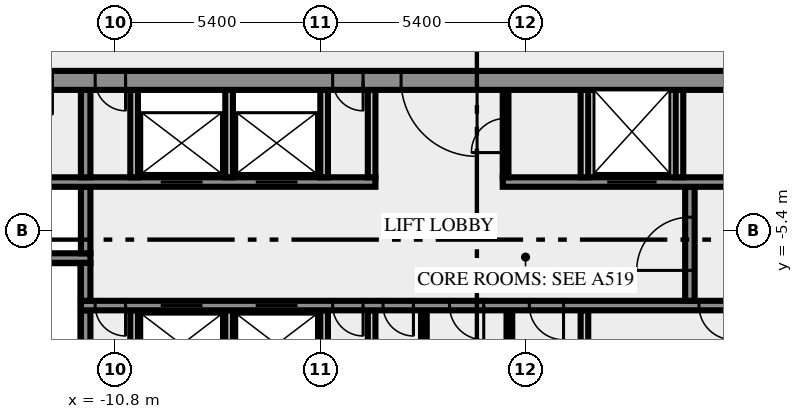
"""IFC4 building model, lengths in metres.
Left out: names, types, materials, properties, quantities, classifications, styles, units other than length and angle.
Written with IfcOpenShell. Run it as: python <this file> out.ifc"""

import sys

from ifc_helpers import new_model, si_unit, direction, frame, frame_2d, origin, place, context, subcontext, project, spatial, rectangle, extrude, element, fill, save


model = new_model("IFC4")
c1 = context("Model", 3, precision=1e-05, world=origin(), true_north=direction((0.0, 1.0)))
c2 = subcontext(c1, "Body", "Model", "MODEL_VIEW")
j1 = project(units=[si_unit("LENGTHUNIT", "METRE"), si_unit("PLANEANGLEUNIT", "RADIAN")], contexts=[c1])
p1 = place(None, origin())
s1 = spatial("IfcSite", under=j1, at=p1, CompositionType="ELEMENT")
p2 = place(p1, origin())
s2 = spatial("IfcBuilding", under=s1, at=p2, CompositionType="ELEMENT")
p3 = place(p2, frame((0.0, 0.0, 315.0)))
s3 = spatial("IfcBuildingStorey", under=s2, at=p3, CompositionType="ELEMENT", Elevation=315.0)
p4 = place(p3, frame((-11.575, -10.5, 0.0), z_axis=(0.0, 0.0, 1.0), x_axis=(0.0, 1.0, 0.0)))
e1 = element("IfcWall", 1, at=p4, inside=s3, PredefinedType="SHEAR", context=c2, shape_type="SweptSolid", body=[
    extrude(rectangle(XDim=3.0, YDim=0.25, at=frame_2d((1.5, 0.0))), origin(), (0.0, 0.0, 1.0), 3.65),
])
for number, where, z_axis, x_axis in (
    (2, (-10.3, -10.5, 0.0), (0.0, 0.0, 1.0), (0.0, 1.0, 0.0)),
    (3, (-7.8, -10.5, 0.0), (0.0, 0.0, 1.0), (0.0, 1.0, 0.0)),
    (4, (-5.3, -10.5, 0.0), (0.0, 0.0, 1.0), (0.0, 1.0, 0.0)),
    (5, (-4.05, -10.5, 0.0), (0.0, 0.0, 1.0), (0.0, 1.0, 0.0)),
):
    element("IfcWall", number, at=place(p3, frame(where, z_axis=z_axis, x_axis=x_axis)), inside=s3, PredefinedType="SOLIDWALL", context=c2, shape_type="SweptSolid", body=[
        extrude(rectangle(XDim=3.0, YDim=0.2, at=frame_2d((1.5, 0.0))), origin(), (0.0, 0.0, 1.0), 3.65),
    ])
for number, where, z_axis, x_axis in (
    (6, (-2.675, -10.5, 0.0), (0.0, 0.0, 1.0), (0.0, 1.0, 0.0)),
    (7, (-0.425, -10.5, 0.0), (0.0, 0.0, 1.0), (0.0, 1.0, 0.0)),
):
    element("IfcWall", number, at=place(p3, frame(where, z_axis=z_axis, x_axis=x_axis)), inside=s3, PredefinedType="PARTITIONING", context=c2, shape_type="SweptSolid", body=[
        extrude(rectangle(XDim=3.0, YDim=0.15, at=frame_2d((1.5, 0.0))), origin(), (0.0, 0.0, 1.0), 3.65),
    ])
p5 = place(p3, frame((1.55, -10.5, 0.0), z_axis=(0.0, 0.0, 1.0), x_axis=(0.0, 1.0, 0.0)))
e8 = element("IfcWall", 8, at=p5, inside=s3, PredefinedType="SOLIDWALL", context=c2, shape_type="SweptSolid", body=[
    extrude(rectangle(XDim=3.0, YDim=0.2, at=frame_2d((1.5, 0.0))), origin(), (0.0, 0.0, 1.0), 3.65),
])
p6 = place(p3, frame((11.7, -7.375, 0.0), z_axis=(0.0, 0.0, 1.0), x_axis=(-1.0, 0.0, 0.0)))
e9 = element("IfcWall", 9, at=p6, inside=s3, PredefinedType="SHEAR", context=c2, shape_type="SweptSolid", body=[
    extrude(rectangle(XDim=23.4, YDim=0.25, at=frame_2d((11.7, 0.0))), origin(), (0.0, 0.0, 1.0), 3.65),
])
p7 = place(p6, frame((22.225, 0.0, 0.0)))
e10 = element("IfcOpeningElement", 10, at=p7, cuts=e9, PredefinedType="OPENING", context=c2, shape_type="SweptSolid", body=[
    extrude(rectangle(XDim=0.8, YDim=2.1, at=frame_2d((0.4, 1.05))), frame((0.0, 0.135, 0.0), z_axis=(0.0, -1.0, 0.0), x_axis=(1.0, 0.0, 0.0)), (0.0, 0.0, 1.0), 0.27),
])
p8 = place(p6, frame((20.2, 0.0, 0.0)))
e11 = element("IfcOpeningElement", 11, at=p8, cuts=e9, PredefinedType="OPENING", context=c2, shape_type="SweptSolid", body=[
    extrude(rectangle(XDim=1.1, YDim=2.1, at=frame_2d((0.55, 1.05))), frame((0.0, 0.135, 0.0), z_axis=(0.0, -1.0, 0.0), x_axis=(1.0, 0.0, 0.0)), (0.0, 0.0, 1.0), 0.27),
])
p9 = place(p6, frame((17.7, 0.0, 0.0)))
e12 = element("IfcOpeningElement", 12, at=p9, cuts=e9, PredefinedType="OPENING", context=c2, shape_type="SweptSolid", body=[
    extrude(rectangle(XDim=1.1, YDim=2.1, at=frame_2d((0.55, 1.05))), frame((0.0, 0.135, 0.0), z_axis=(0.0, -1.0, 0.0), x_axis=(1.0, 0.0, 0.0)), (0.0, 0.0, 1.0), 0.27),
])
p10 = place(p6, frame((15.975, 0.0, 0.0)))
e13 = element("IfcOpeningElement", 13, at=p10, cuts=e9, PredefinedType="OPENING", context=c2, shape_type="SweptSolid", body=[
    extrude(rectangle(XDim=0.8, YDim=2.1, at=frame_2d((0.4, 1.05))), frame((0.0, 0.135, 0.0), z_axis=(0.0, -1.0, 0.0), x_axis=(1.0, 0.0, 0.0)), (0.0, 0.0, 1.0), 0.27),
])
p11 = place(p6, frame((14.65, 0.0, 0.0)))
e14 = element("IfcOpeningElement", 14, at=p11, cuts=e9, PredefinedType="OPENING", context=c2, shape_type="SweptSolid", body=[
    extrude(rectangle(XDim=0.8, YDim=2.1, at=frame_2d((0.4, 1.05))), frame((0.0, 0.135, 0.0), z_axis=(0.0, -1.0, 0.0), x_axis=(1.0, 0.0, 0.0)), (0.0, 0.0, 1.0), 0.27),
])
p12 = place(p6, frame((12.8, 0.0, 0.0)))
e15 = element("IfcOpeningElement", 15, at=p12, cuts=e9, PredefinedType="OPENING", context=c2, shape_type="SweptSolid", body=[
    extrude(rectangle(XDim=0.9, YDim=2.1, at=frame_2d((0.45, 1.05))), frame((0.0, 0.135, 0.0), z_axis=(0.0, -1.0, 0.0), x_axis=(1.0, 0.0, 0.0)), (0.0, 0.0, 1.0), 0.27),
])
p13 = place(p6, frame((10.7, 0.0, 0.0)))
e16 = element("IfcOpeningElement", 16, at=p13, cuts=e9, PredefinedType="OPENING", context=c2, shape_type="SweptSolid", body=[
    extrude(rectangle(XDim=0.9, YDim=2.1, at=frame_2d((0.45, 1.05))), frame((0.0, 0.135, 0.0), z_axis=(0.0, -1.0, 0.0), x_axis=(1.0, 0.0, 0.0)), (0.0, 0.0, 1.0), 0.27),
])
p14 = place(p6, frame((6.237, 0.0, 0.0)))
e17 = element("IfcOpeningElement", 17, at=p14, cuts=e9, PredefinedType="OPENING", context=c2, shape_type="SweptSolid", body=[
    extrude(rectangle(XDim=0.9, YDim=2.1, at=frame_2d((0.45, 1.05))), frame((0.0, 0.135, 0.0), z_axis=(0.0, -1.0, 0.0), x_axis=(1.0, 0.0, 0.0)), (0.0, 0.0, 1.0), 0.27),
])
p15 = place(p6, frame((1.263, 0.0, 0.0)))
e18 = element("IfcOpeningElement", 18, at=p15, cuts=e9, PredefinedType="OPENING", context=c2, shape_type="SweptSolid", body=[
    extrude(rectangle(XDim=0.9, YDim=2.1, at=frame_2d((0.45, 1.05))), frame((0.0, 0.135, 0.0), z_axis=(0.0, -1.0, 0.0), x_axis=(1.0, 0.0, 0.0)), (0.0, 0.0, 1.0), 0.27),
])
p16 = place(p3, frame((-11.575, -7.25, 0.0), z_axis=(0.0, 0.0, 1.0), x_axis=(0.0, 1.0, 0.0)))
e19 = element("IfcWall", 19, at=p16, inside=s3, PredefinedType="SHEAR", context=c2, shape_type="SweptSolid", body=[
    extrude(rectangle(XDim=1.0, YDim=0.25, at=frame_2d((0.5, 0.0))), origin(), (0.0, 0.0, 1.0), 3.65),
])
p17 = place(p3, frame((4.325, -7.25, 0.0), z_axis=(0.0, 0.0, 1.0), x_axis=(0.0, 1.0, 0.0)))
e20 = element("IfcWall", 20, at=p17, inside=s3, PredefinedType="SHEAR", context=c2, shape_type="SweptSolid", body=[
    extrude(rectangle(XDim=3.0, YDim=0.25, at=frame_2d((1.5, 0.0))), origin(), (0.0, 0.0, 1.0), 3.65),
])
p18 = place(p17, frame((0.8, 0.0, 0.0)))
e21 = element("IfcOpeningElement", 21, at=p18, cuts=e20, PredefinedType="OPENING", context=c2, shape_type="SweptSolid", body=[
    extrude(rectangle(XDim=1.4, YDim=2.1, at=frame_2d((0.7, 1.05))), frame((0.0, 0.135, 0.0), z_axis=(0.0, -1.0, 0.0), x_axis=(1.0, 0.0, 0.0)), (0.0, 0.0, 1.0), 0.27),
])
p19 = place(p3, frame((-11.45, -6.125, 0.0), z_axis=(0.0, 0.0, 1.0), x_axis=(-1.0, 0.0, 0.0)))
e22 = element("IfcWall", 22, at=p19, inside=s3, PredefinedType="SHEAR", context=c2, shape_type="SweptSolid", body=[
    extrude(rectangle(XDim=8.05, YDim=0.25, at=frame_2d((4.025, 0.0))), origin(), (0.0, 0.0, 1.0), 3.65),
])
p20 = place(p19, frame((6.2, 0.0, 0.0)))
e23 = element("IfcOpeningElement", 23, at=p20, cuts=e22, PredefinedType="OPENING", context=c2, shape_type="SweptSolid", body=[
    extrude(rectangle(XDim=1.8, YDim=2.1, at=frame_2d((0.9, 1.05))), frame((0.0, 0.135, 0.0), z_axis=(0.0, -1.0, 0.0), x_axis=(1.0, 0.0, 0.0)), (0.0, 0.0, 1.0), 0.27),
])
p21 = place(p3, frame((-11.575, -6.0, 0.0), z_axis=(0.0, 0.0, 1.0), x_axis=(0.0, 1.0, 0.0)))
e24 = element("IfcWall", 24, at=p21, inside=s3, PredefinedType="SHEAR", context=c2, shape_type="SweptSolid", body=[
    extrude(rectangle(XDim=1.75, YDim=0.25, at=frame_2d((0.875, 0.0))), origin(), (0.0, 0.0, 1.0), 3.65),
])
p22 = place(p3, frame((-14.35, -4.125, 0.0), z_axis=(0.0, 0.0, 1.0), x_axis=(1.0, 0.0, 0.0)))
e25 = element("IfcWall", 25, at=p22, inside=s3, PredefinedType="SHEAR", context=c2, shape_type="SweptSolid", body=[
    extrude(rectangle(XDim=10.4, YDim=0.25, at=frame_2d((5.2, 0.0))), origin(), (0.0, 0.0, 1.0), 3.65),
])
p23 = place(p22, frame((4.75, 0.0, 0.0)))
e26 = element("IfcOpeningElement", 26, at=p23, cuts=e25, PredefinedType="OPENING", context=c2, shape_type="SweptSolid", body=[
    extrude(rectangle(XDim=1.1, YDim=2.1, at=frame_2d((0.55, 1.05))), frame((0.0, 0.135, 0.0), z_axis=(0.0, -1.0, 0.0), x_axis=(1.0, 0.0, 0.0)), (0.0, 0.0, 1.0), 0.27),
])
p24 = place(p22, frame((7.25, 0.0, 0.0)))
e27 = element("IfcOpeningElement", 27, at=p24, cuts=e25, PredefinedType="OPENING", context=c2, shape_type="SweptSolid", body=[
    extrude(rectangle(XDim=1.1, YDim=2.1, at=frame_2d((0.55, 1.05))), frame((0.0, 0.135, 0.0), z_axis=(0.0, -1.0, 0.0), x_axis=(1.0, 0.0, 0.0)), (0.0, 0.0, 1.0), 0.27),
])
p25 = place(p3, frame((-0.6, -4.125, 0.0), z_axis=(0.0, 0.0, 1.0), x_axis=(1.0, 0.0, 0.0)))
e28 = element("IfcWall", 28, at=p25, inside=s3, PredefinedType="SHEAR", context=c2, shape_type="SweptSolid", body=[
    extrude(rectangle(XDim=14.95, YDim=0.25, at=frame_2d((7.475, 0.0))), origin(), (0.0, 0.0, 1.0), 3.65),
])
p26 = place(p25, frame((2.75, 0.0, 0.0)))
e29 = element("IfcOpeningElement", 29, at=p26, cuts=e28, PredefinedType="OPENING", context=c2, shape_type="SweptSolid", body=[
    extrude(rectangle(XDim=1.3, YDim=2.1, at=frame_2d((0.65, 1.05))), frame((0.0, 0.135, 0.0), z_axis=(0.0, -1.0, 0.0), x_axis=(1.0, 0.0, 0.0)), (0.0, 0.0, 1.0), 0.27),
])
p27 = place(p3, frame((-11.575, -4.0, 0.0), z_axis=(0.0, 0.0, 1.0), x_axis=(0.0, 1.0, 0.0)))
e30 = element("IfcWall", 30, at=p27, inside=s3, PredefinedType="SHEAR", context=c2, shape_type="SweptSolid", body=[
    extrude(rectangle(XDim=2.3, YDim=0.25, at=frame_2d((1.15, 0.0))), origin(), (0.0, 0.0, 1.0), 3.65),
])
for number, where, z_axis, x_axis in (
    (31, (-10.3, -4.0, 0.0), (0.0, 0.0, 1.0), (0.0, 1.0, 0.0)),
    (32, (-7.8, -4.0, 0.0), (0.0, 0.0, 1.0), (0.0, 1.0, 0.0)),
    (33, (-5.3, -4.0, 0.0), (0.0, 0.0, 1.0), (0.0, 1.0, 0.0)),
    (34, (-4.05, -4.0, 0.0), (0.0, 0.0, 1.0), (0.0, 1.0, 0.0)),
):
    element("IfcWall", number, at=place(p3, frame(where, z_axis=z_axis, x_axis=x_axis)), inside=s3, PredefinedType="SOLIDWALL", context=c2, shape_type="SweptSolid", body=[
        extrude(rectangle(XDim=2.3, YDim=0.2, at=frame_2d((1.15, 0.0))), origin(), (0.0, 0.0, 1.0), 3.65),
    ])
p28 = place(p3, frame((-0.525, -4.0, 0.0), z_axis=(0.0, 0.0, 1.0), x_axis=(0.0, 1.0, 0.0)))
e35 = element("IfcWall", 35, at=p28, inside=s3, PredefinedType="PARTITIONING", context=c2, shape_type="SweptSolid", body=[
    extrude(rectangle(XDim=2.3, YDim=0.15, at=frame_2d((1.15, 0.0))), origin(), (0.0, 0.0, 1.0), 3.65),
])
p29 = place(p28, frame((0.65, 0.0, 0.0)))
e36 = element("IfcOpeningElement", 36, at=p29, cuts=e35, PredefinedType="OPENING", context=c2, shape_type="SweptSolid", body=[
    extrude(rectangle(XDim=0.9, YDim=2.1, at=frame_2d((0.45, 1.05))), frame((0.0, 0.085, 0.0), z_axis=(0.0, -1.0, 0.0), x_axis=(1.0, 0.0, 0.0)), (0.0, 0.0, 1.0), 0.17),
])
for number, where, z_axis, x_axis in (
    (37, (1.55, -4.0, 0.0), (0.0, 0.0, 1.0), (0.0, 1.0, 0.0)),
    (38, (4.05, -4.0, 0.0), (0.0, 0.0, 1.0), (0.0, 1.0, 0.0)),
):
    element("IfcWall", number, at=place(p3, frame(where, z_axis=z_axis, x_axis=x_axis)), inside=s3, PredefinedType="SOLIDWALL", context=c2, shape_type="SweptSolid", body=[
        extrude(rectangle(XDim=2.3, YDim=0.2, at=frame_2d((1.15, 0.0))), origin(), (0.0, 0.0, 1.0), 3.65),
    ])
p30 = place(p3, frame((20.49, -1.45, 0.0), z_axis=(0.0, 0.0, 1.0), x_axis=(-1.0, 0.0, 0.0)))
e39 = element("IfcWall", 39, at=p30, inside=s3, PredefinedType="SHEAR", context=c2, shape_type="SweptSolid", body=[
    extrude(rectangle(XDim=40.98, YDim=0.5, at=frame_2d((20.49, 0.0))), origin(), (0.0, 0.0, 1.0), 3.65),
])
p31 = place(p30, frame((38.14, 0.0, 0.0)))
e40 = element("IfcOpeningElement", 40, at=p31, cuts=e39, PredefinedType="OPENING", context=c2, shape_type="SweptSolid", body=[
    extrude(rectangle(XDim=1.8, YDim=2.1, at=frame_2d((0.9, 1.05))), frame((0.0, 0.26, 0.0), z_axis=(0.0, -1.0, 0.0), x_axis=(1.0, 0.0, 0.0)), (0.0, 0.0, 1.0), 0.52),
])
p32 = place(p30, frame((35.89, 0.0, 0.0)))
e41 = element("IfcOpeningElement", 41, at=p32, cuts=e39, PredefinedType="OPENING", context=c2, shape_type="SweptSolid", body=[
    extrude(rectangle(XDim=0.9, YDim=2.1, at=frame_2d((0.45, 1.05))), frame((0.0, 0.26, 0.0), z_axis=(0.0, -1.0, 0.0), x_axis=(1.0, 0.0, 0.0)), (0.0, 0.0, 1.0), 0.52),
])
p33 = place(p30, frame((32.94, 0.0, 0.0)))
e42 = element("IfcOpeningElement", 42, at=p33, cuts=e39, PredefinedType="OPENING", context=c2, shape_type="SweptSolid", body=[
    extrude(rectangle(XDim=0.9, YDim=2.1, at=frame_2d((0.45, 1.05))), frame((0.0, 0.26, 0.0), z_axis=(0.0, -1.0, 0.0), x_axis=(1.0, 0.0, 0.0)), (0.0, 0.0, 1.0), 0.52),
])
p34 = place(p30, frame((31.015, 0.0, 0.0)))
e43 = element("IfcOpeningElement", 43, at=p34, cuts=e39, PredefinedType="OPENING", context=c2, shape_type="SweptSolid", body=[
    extrude(rectangle(XDim=0.8, YDim=2.1, at=frame_2d((0.4, 1.05))), frame((0.0, 0.26, 0.0), z_axis=(0.0, -1.0, 0.0), x_axis=(1.0, 0.0, 0.0)), (0.0, 0.0, 1.0), 0.52),
])
p35 = place(p30, frame((24.765, 0.0, 0.0)))
e44 = element("IfcOpeningElement", 44, at=p35, cuts=e39, PredefinedType="OPENING", context=c2, shape_type="SweptSolid", body=[
    extrude(rectangle(XDim=0.8, YDim=2.1, at=frame_2d((0.4, 1.05))), frame((0.0, 0.26, 0.0), z_axis=(0.0, -1.0, 0.0), x_axis=(1.0, 0.0, 0.0)), (0.0, 0.0, 1.0), 0.52),
])
p36 = place(p30, frame((21.765, 0.0, 0.0)))
e45 = element("IfcOpeningElement", 45, at=p36, cuts=e39, PredefinedType="OPENING", context=c2, shape_type="SweptSolid", body=[
    extrude(rectangle(XDim=2.0, YDim=2.1, at=frame_2d((1.0, 1.05))), frame((0.0, 0.26, 0.0), z_axis=(0.0, -1.0, 0.0), x_axis=(1.0, 0.0, 0.0)), (0.0, 0.0, 1.0), 0.52),
])
p37 = place(p30, frame((12.24, 0.0, 0.0)))
e46 = element("IfcOpeningElement", 46, at=p37, cuts=e39, PredefinedType="OPENING", context=c2, shape_type="SweptSolid", body=[
    extrude(rectangle(XDim=0.9, YDim=2.1, at=frame_2d((0.45, 1.05))), frame((0.0, 0.26, 0.0), z_axis=(0.0, -1.0, 0.0), x_axis=(1.0, 0.0, 0.0)), (0.0, 0.0, 1.0), 0.52),
])
p38 = place(p30, frame((7.14, 0.0, 0.0)))
e47 = element("IfcOpeningElement", 47, at=p38, cuts=e39, PredefinedType="OPENING", context=c2, shape_type="SweptSolid", body=[
    extrude(rectangle(XDim=0.9, YDim=2.1, at=frame_2d((0.45, 1.05))), frame((0.0, 0.26, 0.0), z_axis=(0.0, -1.0, 0.0), x_axis=(1.0, 0.0, 0.0)), (0.0, 0.0, 1.0), 0.52),
])
p39 = place(p30, frame((5.028, 0.0, 0.0)))
e48 = element("IfcOpeningElement", 48, at=p39, cuts=e39, PredefinedType="OPENING", context=c2, shape_type="SweptSolid", body=[
    extrude(rectangle(XDim=0.8, YDim=2.1, at=frame_2d((0.4, 1.05))), frame((0.0, 0.26, 0.0), z_axis=(0.0, -1.0, 0.0), x_axis=(1.0, 0.0, 0.0)), (0.0, 0.0, 1.0), 0.52),
])
p40 = place(p30, frame((3.452, 0.0, 0.0)))
e49 = element("IfcOpeningElement", 49, at=p40, cuts=e39, PredefinedType="OPENING", context=c2, shape_type="SweptSolid", body=[
    extrude(rectangle(XDim=0.8, YDim=2.1, at=frame_2d((0.4, 1.05))), frame((0.0, 0.26, 0.0), z_axis=(0.0, -1.0, 0.0), x_axis=(1.0, 0.0, 0.0)), (0.0, 0.0, 1.0), 0.52),
])
p41 = place(p30, frame((1.04, 0.0, 0.0)))
e50 = element("IfcOpeningElement", 50, at=p41, cuts=e39, PredefinedType="OPENING", context=c2, shape_type="SweptSolid", body=[
    extrude(rectangle(XDim=1.8, YDim=2.1, at=frame_2d((0.9, 1.05))), frame((0.0, 0.26, 0.0), z_axis=(0.0, -1.0, 0.0), x_axis=(1.0, 0.0, 0.0)), (0.0, 0.0, 1.0), 0.52),
])
p42 = place(p7, origin())
e51 = element("IfcDoor", 51, at=p42, inside=s3, OperationType="SINGLE_SWING_RIGHT", PredefinedType="DOOR", context=c2, shape_type="SweptSolid", body=[
    extrude(rectangle(XDim=0.8, YDim=2.1, at=frame_2d((0.4, 1.05))), frame((0.0, 0.025, 0.0), z_axis=(0.0, -1.0, 0.0), x_axis=(1.0, 0.0, 0.0)), (0.0, 0.0, 1.0), 0.05),
])
fill(e10, e51)
p43 = place(p8, origin())
e52 = element("IfcDoor", 52, at=p43, inside=s3, OperationType="DOUBLE_DOOR_SLIDING", PredefinedType="DOOR", context=c2, shape_type="SweptSolid", body=[
    extrude(rectangle(XDim=1.1, YDim=2.1, at=frame_2d((0.55, 1.05))), frame((0.0, 0.025, 0.0), z_axis=(0.0, -1.0, 0.0), x_axis=(1.0, 0.0, 0.0)), (0.0, 0.0, 1.0), 0.05),
])
fill(e11, e52)
p44 = place(p9, origin())
e53 = element("IfcDoor", 53, at=p44, inside=s3, OperationType="DOUBLE_DOOR_SLIDING", PredefinedType="DOOR", context=c2, shape_type="SweptSolid", body=[
    extrude(rectangle(XDim=1.1, YDim=2.1, at=frame_2d((0.55, 1.05))), frame((0.0, 0.025, 0.0), z_axis=(0.0, -1.0, 0.0), x_axis=(1.0, 0.0, 0.0)), (0.0, 0.0, 1.0), 0.05),
])
fill(e12, e53)
p45 = place(p10, origin())
e54 = element("IfcDoor", 54, at=p45, inside=s3, OperationType="SINGLE_SWING_RIGHT", PredefinedType="DOOR", context=c2, shape_type="SweptSolid", body=[
    extrude(rectangle(XDim=0.8, YDim=2.1, at=frame_2d((0.4, 1.05))), frame((0.0, 0.025, 0.0), z_axis=(0.0, -1.0, 0.0), x_axis=(1.0, 0.0, 0.0)), (0.0, 0.0, 1.0), 0.05),
])
fill(e13, e54)
p46 = place(p11, origin())
e55 = element("IfcDoor", 55, at=p46, inside=s3, OperationType="SINGLE_SWING_RIGHT", PredefinedType="DOOR", context=c2, shape_type="SweptSolid", body=[
    extrude(rectangle(XDim=0.8, YDim=2.1, at=frame_2d((0.4, 1.05))), frame((0.0, 0.025, 0.0), z_axis=(0.0, -1.0, 0.0), x_axis=(1.0, 0.0, 0.0)), (0.0, 0.0, 1.0), 0.05),
])
fill(e14, e55)
p47 = place(p12, origin())
e56 = element("IfcDoor", 56, at=p47, inside=s3, OperationType="SINGLE_SWING_RIGHT", PredefinedType="DOOR", context=c2, shape_type="SweptSolid", body=[
    extrude(rectangle(XDim=0.9, YDim=2.1, at=frame_2d((0.45, 1.05))), frame((0.0, 0.025, 0.0), z_axis=(0.0, -1.0, 0.0), x_axis=(1.0, 0.0, 0.0)), (0.0, 0.0, 1.0), 0.05),
])
fill(e15, e56)
p48 = place(p13, origin())
e57 = element("IfcDoor", 57, at=p48, inside=s3, OperationType="SINGLE_SWING_LEFT", PredefinedType="DOOR", context=c2, shape_type="SweptSolid", body=[
    extrude(rectangle(XDim=0.9, YDim=2.1, at=frame_2d((0.45, 1.05))), frame((0.0, 0.025, 0.0), z_axis=(0.0, -1.0, 0.0), x_axis=(1.0, 0.0, 0.0)), (0.0, 0.0, 1.0), 0.05),
])
fill(e16, e57)
p49 = place(p14, origin())
e58 = element("IfcDoor", 58, at=p49, inside=s3, OperationType="SINGLE_SWING_LEFT", PredefinedType="DOOR", context=c2, shape_type="SweptSolid", body=[
    extrude(rectangle(XDim=0.9, YDim=2.1, at=frame_2d((0.45, 1.05))), frame((0.0, 0.025, 0.0), z_axis=(0.0, -1.0, 0.0), x_axis=(1.0, 0.0, 0.0)), (0.0, 0.0, 1.0), 0.05),
])
fill(e17, e58)
p50 = place(p18, origin())
e59 = element("IfcDoor", 59, at=p50, inside=s3, OperationType="DOUBLE_DOOR_SINGLE_SWING", PredefinedType="DOOR", context=c2, shape_type="SweptSolid", body=[
    extrude(rectangle(XDim=1.4, YDim=2.1, at=frame_2d((0.7, 1.05))), frame((0.0, 0.025, 0.0), z_axis=(0.0, -1.0, 0.0), x_axis=(1.0, 0.0, 0.0)), (0.0, 0.0, 1.0), 0.05),
])
fill(e21, e59)
p51 = place(p23, origin())
e60 = element("IfcDoor", 60, at=p51, inside=s3, OperationType="DOUBLE_DOOR_SLIDING", PredefinedType="DOOR", context=c2, shape_type="SweptSolid", body=[
    extrude(rectangle(XDim=1.1, YDim=2.1, at=frame_2d((0.55, 1.05))), frame((0.0, 0.025, 0.0), z_axis=(0.0, -1.0, 0.0), x_axis=(1.0, 0.0, 0.0)), (0.0, 0.0, 1.0), 0.05),
])
fill(e26, e60)
p52 = place(p24, origin())
e61 = element("IfcDoor", 61, at=p52, inside=s3, OperationType="DOUBLE_DOOR_SLIDING", PredefinedType="DOOR", context=c2, shape_type="SweptSolid", body=[
    extrude(rectangle(XDim=1.1, YDim=2.1, at=frame_2d((0.55, 1.05))), frame((0.0, 0.025, 0.0), z_axis=(0.0, -1.0, 0.0), x_axis=(1.0, 0.0, 0.0)), (0.0, 0.0, 1.0), 0.05),
])
fill(e27, e61)
p53 = place(p26, origin())
e62 = element("IfcDoor", 62, at=p53, inside=s3, OperationType="DOUBLE_DOOR_SLIDING", PredefinedType="DOOR", context=c2, shape_type="SweptSolid", body=[
    extrude(rectangle(XDim=1.3, YDim=2.1, at=frame_2d((0.65, 1.05))), frame((0.0, 0.025, 0.0), z_axis=(0.0, -1.0, 0.0), x_axis=(1.0, 0.0, 0.0)), (0.0, 0.0, 1.0), 0.05),
])
fill(e29, e62)
p54 = place(p29, origin())
e63 = element("IfcDoor", 63, at=p54, inside=s3, OperationType="SINGLE_SWING_LEFT", PredefinedType="DOOR", context=c2, shape_type="SweptSolid", body=[
    extrude(rectangle(XDim=0.9, YDim=2.1, at=frame_2d((0.45, 1.05))), frame((0.0, 0.025, 0.0), z_axis=(0.0, -1.0, 0.0), x_axis=(1.0, 0.0, 0.0)), (0.0, 0.0, 1.0), 0.05),
])
fill(e36, e63)
p55 = place(p34, origin())
e64 = element("IfcDoor", 64, at=p55, inside=s3, OperationType="SINGLE_SWING_RIGHT", PredefinedType="DOOR", context=c2, shape_type="SweptSolid", body=[
    extrude(rectangle(XDim=0.8, YDim=2.1, at=frame_2d((0.4, 1.05))), frame((0.0, 0.025, 0.0), z_axis=(0.0, -1.0, 0.0), x_axis=(1.0, 0.0, 0.0)), (0.0, 0.0, 1.0), 0.05),
])
fill(e43, e64)
p56 = place(p35, origin())
e65 = element("IfcDoor", 65, at=p56, inside=s3, OperationType="SINGLE_SWING_RIGHT", PredefinedType="DOOR", context=c2, shape_type="SweptSolid", body=[
    extrude(rectangle(XDim=0.8, YDim=2.1, at=frame_2d((0.4, 1.05))), frame((0.0, 0.025, 0.0), z_axis=(0.0, -1.0, 0.0), x_axis=(1.0, 0.0, 0.0)), (0.0, 0.0, 1.0), 0.05),
])
fill(e44, e65)
p57 = place(p36, origin())
e66 = element("IfcDoor", 66, at=p57, inside=s3, OperationType="DOUBLE_DOOR_SINGLE_SWING", PredefinedType="DOOR", context=c2, shape_type="SweptSolid", body=[
    extrude(rectangle(XDim=2.0, YDim=2.1, at=frame_2d((1.0, 1.05))), frame((0.0, 0.025, 0.0), z_axis=(0.0, -1.0, 0.0), x_axis=(1.0, 0.0, 0.0)), (0.0, 0.0, 1.0), 0.05),
])
fill(e45, e66)
save(model, sys.argv[1])
